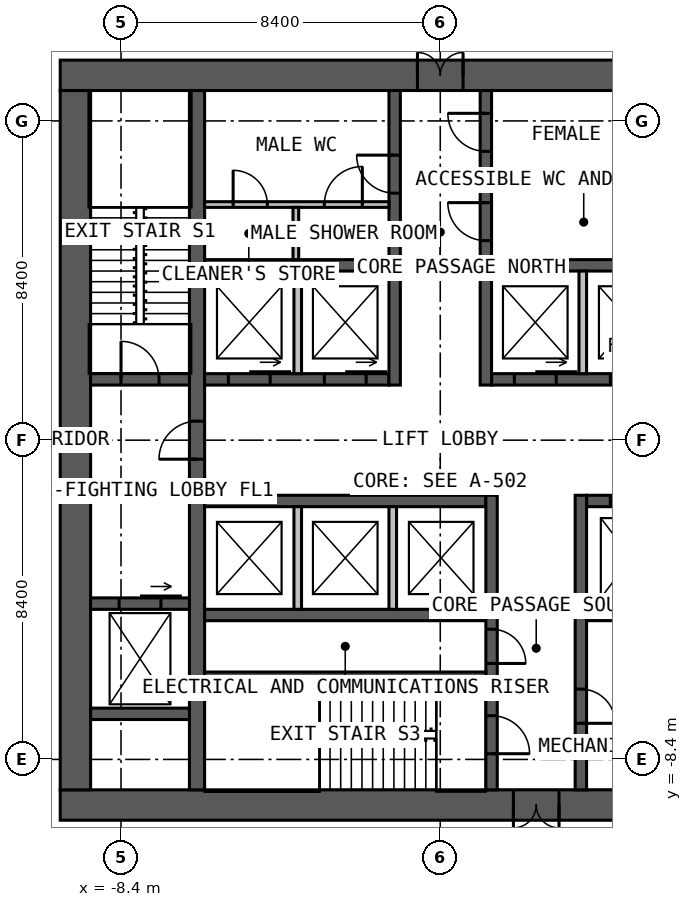
"""IFC4 building model, lengths in metres.
Left out: names, types, materials, properties, quantities, classifications, styles, units other than length and angle.
Written with IfcOpenShell. Run it as: python <this file> out.ifc"""

import sys

from ifc_helpers import new_model, si_unit, direction, frame, frame_2d, origin, place, context, subcontext, project, spatial, rectangle, extrude, element, fill, save


model = new_model("IFC4")
c1 = context("Model", 3, precision=1e-05, world=origin(), true_north=direction((0.0, 1.0)))
c2 = subcontext(c1, "Body", "Model", "MODEL_VIEW")
j1 = project(units=[si_unit("LENGTHUNIT", "METRE"), si_unit("PLANEANGLEUNIT", "RADIAN")], contexts=[c1])
p1 = place(None, origin())
s1 = spatial("IfcSite", under=j1, at=p1, CompositionType="ELEMENT")
p2 = place(p1, origin())
s2 = spatial("IfcBuilding", under=s1, at=p2, CompositionType="ELEMENT")
p3 = place(p2, frame((0.0, 0.0, 81.0)))
s3 = spatial("IfcBuildingStorey", under=s2, at=p3, CompositionType="ELEMENT", Elevation=81.0)
p4 = place(p3, frame((-10.0, 9.6, 0.0), z_axis=(0.0, 0.0, 1.0), x_axis=(1.0, 0.0, 0.0)))
e1 = element("IfcWall", 1, at=p4, inside=s3, PredefinedType="SOLIDWALL", context=c2, shape_type="SweptSolid", body=[
    extrude(rectangle(XDim=20.0, YDim=0.8, at=frame_2d((10.0, 0.0))), origin(), (0.0, 0.0, 1.0), 4.0),
])
p5 = place(p4, frame((9.4, 0.0, 0.0)))
e2 = element("IfcOpeningElement", 2, at=p5, cuts=e1, PredefinedType="OPENING", context=c2, shape_type="SweptSolid", body=[
    extrude(rectangle(XDim=1.2, YDim=2.2, at=frame_2d((0.6, 1.1))), frame((0.0, 0.41, 0.0), z_axis=(0.0, -1.0, 0.0), x_axis=(1.0, 0.0, 0.0)), (0.0, 0.0, 1.0), 0.82),
])
p6 = place(p3, frame((10.0, -9.6, 0.0), z_axis=(0.0, 0.0, 1.0), x_axis=(-1.0, 0.0, 0.0)))
e3 = element("IfcWall", 3, at=p6, inside=s3, PredefinedType="SOLIDWALL", context=c2, shape_type="SweptSolid", body=[
    extrude(rectangle(XDim=20.0, YDim=0.8, at=frame_2d((10.0, 0.0))), origin(), (0.0, 0.0, 1.0), 4.0),
])
p7 = place(p6, frame((6.875, 0.0, 0.0)))
e4 = element("IfcOpeningElement", 4, at=p7, cuts=e3, PredefinedType="OPENING", context=c2, shape_type="SweptSolid", body=[
    extrude(rectangle(XDim=1.2, YDim=2.2, at=frame_2d((0.6, 1.1))), frame((0.0, 0.41, 0.0), z_axis=(0.0, -1.0, 0.0), x_axis=(1.0, 0.0, 0.0)), (0.0, 0.0, 1.0), 0.82),
])
p8 = place(p3, frame((-9.6, 9.2, 0.0), z_axis=(0.0, 0.0, 1.0), x_axis=(0.0, -1.0, 0.0)))
e5 = element("IfcWall", 5, at=p8, inside=s3, PredefinedType="SOLIDWALL", context=c2, shape_type="SweptSolid", body=[
    extrude(rectangle(XDim=18.4, YDim=0.8, at=frame_2d((9.2, 0.0))), origin(), (0.0, 0.0, 1.0), 4.0),
])
p9 = place(p3, frame((-6.4, -9.2, 0.0), z_axis=(0.0, 0.0, 1.0), x_axis=(0.0, 1.0, 0.0)))
e6 = element("IfcWall", 6, at=p9, inside=s3, PredefinedType="SOLIDWALL", context=c2, shape_type="SweptSolid", body=[
    extrude(rectangle(XDim=18.4, YDim=0.4, at=frame_2d((9.2, 0.0))), origin(), (0.0, 0.0, 1.0), 4.0),
])
p10 = place(p9, frame((8.7, 0.0, 0.0)))
e7 = element("IfcOpeningElement", 7, at=p10, cuts=e6, PredefinedType="OPENING", context=c2, shape_type="SweptSolid", body=[
    extrude(rectangle(XDim=1.0, YDim=2.2, at=frame_2d((0.5, 1.1))), frame((0.0, 0.21, 0.0), z_axis=(0.0, -1.0, 0.0), x_axis=(1.0, 0.0, 0.0)), (0.0, 0.0, 1.0), 0.42),
])
p11 = place(p3, frame((-6.2, 1.6, 0.0), z_axis=(0.0, 0.0, 1.0), x_axis=(1.0, 0.0, 0.0)))
e8 = element("IfcWall", 8, at=p11, inside=s3, PredefinedType="SOLIDWALL", context=c2, shape_type="SweptSolid", body=[
    extrude(rectangle(XDim=4.85, YDim=0.3, at=frame_2d((2.425, 0.0))), origin(), (0.0, 0.0, 1.0), 4.0),
])
p12 = place(p11, frame((0.625, 0.0, 0.0)))
e9 = element("IfcOpeningElement", 9, at=p12, cuts=e8, PredefinedType="OPENING", context=c2, shape_type="SweptSolid", body=[
    extrude(rectangle(XDim=1.1, YDim=2.2, at=frame_2d((0.55, 1.1))), frame((0.0, 0.16, 0.0), z_axis=(0.0, -1.0, 0.0), x_axis=(1.0, 0.0, 0.0)), (0.0, 0.0, 1.0), 0.32),
])
p13 = place(p11, frame((3.15, 0.0, 0.0)))
e10 = element("IfcOpeningElement", 10, at=p13, cuts=e8, PredefinedType="OPENING", context=c2, shape_type="SweptSolid", body=[
    extrude(rectangle(XDim=1.1, YDim=2.2, at=frame_2d((0.55, 1.1))), frame((0.0, 0.16, 0.0), z_axis=(0.0, -1.0, 0.0), x_axis=(1.0, 0.0, 0.0)), (0.0, 0.0, 1.0), 0.32),
])
p14 = place(p3, frame((1.35, 1.6, 0.0), z_axis=(0.0, 0.0, 1.0), x_axis=(1.0, 0.0, 0.0)))
e11 = element("IfcWall", 11, at=p14, inside=s3, PredefinedType="SOLIDWALL", context=c2, shape_type="SweptSolid", body=[
    extrude(rectangle(XDim=4.85, YDim=0.3, at=frame_2d((2.425, 0.0))), origin(), (0.0, 0.0, 1.0), 4.0),
])
p15 = place(p14, frame((0.6, 0.0, 0.0)))
e12 = element("IfcOpeningElement", 12, at=p15, cuts=e11, PredefinedType="OPENING", context=c2, shape_type="SweptSolid", body=[
    extrude(rectangle(XDim=1.1, YDim=2.2, at=frame_2d((0.55, 1.1))), frame((0.0, 0.16, 0.0), z_axis=(0.0, -1.0, 0.0), x_axis=(1.0, 0.0, 0.0)), (0.0, 0.0, 1.0), 0.32),
])
p16 = place(p14, frame((3.125, 0.0, 0.0)))
e13 = element("IfcOpeningElement", 13, at=p16, cuts=e11, PredefinedType="OPENING", context=c2, shape_type="SweptSolid", body=[
    extrude(rectangle(XDim=1.1, YDim=2.2, at=frame_2d((0.55, 1.1))), frame((0.0, 0.16, 0.0), z_axis=(0.0, -1.0, 0.0), x_axis=(1.0, 0.0, 0.0)), (0.0, 0.0, 1.0), 0.32),
])
for number, where, z_axis, x_axis in (
    (14, (-6.2, 4.6, 0.0), (0.0, 0.0, 1.0), (1.0, 0.0, 0.0)),
    (15, (1.35, 4.6, 0.0), (0.0, 0.0, 1.0), (1.0, 0.0, 0.0)),
):
    element("IfcWall", number, at=place(p3, frame(where, z_axis=z_axis, x_axis=x_axis)), inside=s3, PredefinedType="SOLIDWALL", context=c2, shape_type="SweptSolid", body=[
        extrude(rectangle(XDim=4.85, YDim=0.3, at=frame_2d((2.425, 0.0))), origin(), (0.0, 0.0, 1.0), 4.0),
    ])
p17 = place(p3, frame((-1.2, 1.45, 0.0), z_axis=(0.0, 0.0, 1.0), x_axis=(0.0, 1.0, 0.0)))
e16 = element("IfcWall", 16, at=p17, inside=s3, PredefinedType="SOLIDWALL", context=c2, shape_type="SweptSolid", body=[
    extrude(rectangle(XDim=7.75, YDim=0.3, at=frame_2d((3.875, 0.0))), origin(), (0.0, 0.0, 1.0), 4.0),
])
p18 = place(p17, frame((5.05, 0.0, 0.0)))
e17 = element("IfcOpeningElement", 17, at=p18, cuts=e16, PredefinedType="OPENING", context=c2, shape_type="SweptSolid", body=[
    extrude(rectangle(XDim=1.0, YDim=2.2, at=frame_2d((0.5, 1.1))), frame((0.0, 0.16, 0.0), z_axis=(0.0, -1.0, 0.0), x_axis=(1.0, 0.0, 0.0)), (0.0, 0.0, 1.0), 0.32),
])
p19 = place(p3, frame((1.2, 1.45, 0.0), z_axis=(0.0, 0.0, 1.0), x_axis=(0.0, 1.0, 0.0)))
e18 = element("IfcWall", 18, at=p19, inside=s3, PredefinedType="SOLIDWALL", context=c2, shape_type="SweptSolid", body=[
    extrude(rectangle(XDim=7.75, YDim=0.3, at=frame_2d((3.875, 0.0))), origin(), (0.0, 0.0, 1.0), 4.0),
])
p20 = place(p19, frame((3.8, 0.0, 0.0)))
e19 = element("IfcOpeningElement", 19, at=p20, cuts=e18, PredefinedType="OPENING", context=c2, shape_type="SweptSolid", body=[
    extrude(rectangle(XDim=1.0, YDim=2.2, at=frame_2d((0.5, 1.1))), frame((0.0, 0.16, 0.0), z_axis=(0.0, -1.0, 0.0), x_axis=(1.0, 0.0, 0.0)), (0.0, 0.0, 1.0), 0.32),
])
p21 = place(p19, frame((6.15, 0.0, 0.0)))
e20 = element("IfcOpeningElement", 20, at=p21, cuts=e18, PredefinedType="OPENING", context=c2, shape_type="SweptSolid", body=[
    extrude(rectangle(XDim=1.0, YDim=2.2, at=frame_2d((0.5, 1.1))), frame((0.0, 0.16, 0.0), z_axis=(0.0, -1.0, 0.0), x_axis=(1.0, 0.0, 0.0)), (0.0, 0.0, 1.0), 0.32),
])
p22 = place(p3, frame((-6.2, -1.6, 0.0), z_axis=(0.0, 0.0, 1.0), x_axis=(1.0, 0.0, 0.0)))
e21 = element("IfcWall", 21, at=p22, inside=s3, PredefinedType="SOLIDWALL", context=c2, shape_type="SweptSolid", body=[
    extrude(rectangle(XDim=7.4, YDim=0.3, at=frame_2d((3.7, 0.0))), origin(), (0.0, 0.0, 1.0), 4.0),
])
p23 = place(p3, frame((3.85, -1.6, 0.0), z_axis=(0.0, 0.0, 1.0), x_axis=(1.0, 0.0, 0.0)))
e22 = element("IfcWall", 22, at=p23, inside=s3, PredefinedType="SOLIDWALL", context=c2, shape_type="SweptSolid", body=[
    extrude(rectangle(XDim=2.35, YDim=0.3, at=frame_2d((1.175, 0.0))), origin(), (0.0, 0.0, 1.0), 4.0),
])
p24 = place(p23, frame((0.625, 0.0, 0.0)))
e23 = element("IfcOpeningElement", 23, at=p24, cuts=e22, PredefinedType="OPENING", context=c2, shape_type="SweptSolid", body=[
    extrude(rectangle(XDim=1.1, YDim=2.2, at=frame_2d((0.55, 1.1))), frame((0.0, 0.16, 0.0), z_axis=(0.0, -1.0, 0.0), x_axis=(1.0, 0.0, 0.0)), (0.0, 0.0, 1.0), 0.32),
])
p25 = place(p3, frame((-6.2, -4.6, 0.0), z_axis=(0.0, 0.0, 1.0), x_axis=(1.0, 0.0, 0.0)))
e24 = element("IfcWall", 24, at=p25, inside=s3, PredefinedType="SOLIDWALL", context=c2, shape_type="SweptSolid", body=[
    extrude(rectangle(XDim=7.4, YDim=0.3, at=frame_2d((3.7, 0.0))), origin(), (0.0, 0.0, 1.0), 4.0),
])
p26 = place(p3, frame((3.85, -4.6, 0.0), z_axis=(0.0, 0.0, 1.0), x_axis=(1.0, 0.0, 0.0)))
e25 = element("IfcWall", 25, at=p26, inside=s3, PredefinedType="SOLIDWALL", context=c2, shape_type="SweptSolid", body=[
    extrude(rectangle(XDim=2.35, YDim=0.3, at=frame_2d((1.175, 0.0))), origin(), (0.0, 0.0, 1.0), 4.0),
])
p27 = place(p3, frame((1.35, -1.45, 0.0), z_axis=(0.0, 0.0, 1.0), x_axis=(0.0, -1.0, 0.0)))
e26 = element("IfcWall", 26, at=p27, inside=s3, PredefinedType="SOLIDWALL", context=c2, shape_type="SweptSolid", body=[
    extrude(rectangle(XDim=7.75, YDim=0.3, at=frame_2d((3.875, 0.0))), origin(), (0.0, 0.0, 1.0), 4.0),
])
p28 = place(p27, frame((5.8, 0.0, 0.0)))
e27 = element("IfcOpeningElement", 27, at=p28, cuts=e26, PredefinedType="OPENING", context=c2, shape_type="SweptSolid", body=[
    extrude(rectangle(XDim=1.0, YDim=2.2, at=frame_2d((0.5, 1.1))), frame((0.0, 0.16, 0.0), z_axis=(0.0, -1.0, 0.0), x_axis=(1.0, 0.0, 0.0)), (0.0, 0.0, 1.0), 0.32),
])
p29 = place(p27, frame((3.525, 0.0, 0.0)))
e28 = element("IfcOpeningElement", 28, at=p29, cuts=e26, PredefinedType="OPENING", context=c2, shape_type="SweptSolid", body=[
    extrude(rectangle(XDim=0.9, YDim=2.2, at=frame_2d((0.45, 1.1))), frame((0.0, 0.16, 0.0), z_axis=(0.0, -1.0, 0.0), x_axis=(1.0, 0.0, 0.0)), (0.0, 0.0, 1.0), 0.32),
])
p30 = place(p3, frame((3.7, -1.45, 0.0), z_axis=(0.0, 0.0, 1.0), x_axis=(0.0, -1.0, 0.0)))
e29 = element("IfcWall", 29, at=p30, inside=s3, PredefinedType="SOLIDWALL", context=c2, shape_type="SweptSolid", body=[
    extrude(rectangle(XDim=7.75, YDim=0.3, at=frame_2d((3.875, 0.0))), origin(), (0.0, 0.0, 1.0), 4.0),
])
p31 = place(p30, frame((5.1, 0.0, 0.0)))
e30 = element("IfcOpeningElement", 30, at=p31, cuts=e29, PredefinedType="OPENING", context=c2, shape_type="SweptSolid", body=[
    extrude(rectangle(XDim=0.9, YDim=2.2, at=frame_2d((0.45, 1.1))), frame((0.0, 0.16, 0.0), z_axis=(0.0, -1.0, 0.0), x_axis=(1.0, 0.0, 0.0)), (0.0, 0.0, 1.0), 0.32),
])
p32 = place(p3, frame((-6.2, -6.2, 0.0), z_axis=(0.0, 0.0, 1.0), x_axis=(1.0, 0.0, 0.0)))
e31 = element("IfcWall", 31, at=p32, inside=s3, PredefinedType="SOLIDWALL", context=c2, shape_type="SweptSolid", body=[
    extrude(rectangle(XDim=7.4, YDim=0.2, at=frame_2d((3.7, 0.0))), origin(), (0.0, 0.0, 1.0), 4.0),
])
p33 = place(p3, frame((-9.2, 1.6, 0.0), z_axis=(0.0, 0.0, 1.0), x_axis=(1.0, 0.0, 0.0)))
e32 = element("IfcWall", 32, at=p33, inside=s3, PredefinedType="SOLIDWALL", context=c2, shape_type="SweptSolid", body=[
    extrude(rectangle(XDim=2.6, YDim=0.3, at=frame_2d((1.3, 0.0))), origin(), (0.0, 0.0, 1.0), 4.0),
])
p34 = place(p33, frame((0.8, 0.0, 0.0)))
e33 = element("IfcOpeningElement", 33, at=p34, cuts=e32, PredefinedType="OPENING", context=c2, shape_type="SweptSolid", body=[
    extrude(rectangle(XDim=1.0, YDim=2.2, at=frame_2d((0.5, 1.1))), frame((0.0, 0.16, 0.0), z_axis=(0.0, -1.0, 0.0), x_axis=(1.0, 0.0, 0.0)), (0.0, 0.0, 1.0), 0.32),
])
p35 = place(p3, frame((-9.2, -4.3, 0.0), z_axis=(0.0, 0.0, 1.0), x_axis=(1.0, 0.0, 0.0)))
e34 = element("IfcWall", 34, at=p35, inside=s3, PredefinedType="SOLIDWALL", context=c2, shape_type="SweptSolid", body=[
    extrude(rectangle(XDim=2.6, YDim=0.3, at=frame_2d((1.3, 0.0))), origin(), (0.0, 0.0, 1.0), 4.0),
])
p36 = place(p35, frame((0.75, 0.0, 0.0)))
e35 = element("IfcOpeningElement", 35, at=p36, cuts=e34, PredefinedType="OPENING", context=c2, shape_type="SweptSolid", body=[
    extrude(rectangle(XDim=1.1, YDim=2.2, at=frame_2d((0.55, 1.1))), frame((0.0, 0.16, 0.0), z_axis=(0.0, -1.0, 0.0), x_axis=(1.0, 0.0, 0.0)), (0.0, 0.0, 1.0), 0.32),
])
p37 = place(p3, frame((-9.2, -7.2, 0.0), z_axis=(0.0, 0.0, 1.0), x_axis=(1.0, 0.0, 0.0)))
e36 = element("IfcWall", 36, at=p37, inside=s3, PredefinedType="SOLIDWALL", context=c2, shape_type="SweptSolid", body=[
    extrude(rectangle(XDim=2.6, YDim=0.3, at=frame_2d((1.3, 0.0))), origin(), (0.0, 0.0, 1.0), 4.0),
])
for number, where, z_axis, x_axis in (
    (37, (-3.75, 1.75, 0.0), (0.0, 0.0, 1.0), (0.0, 1.0, 0.0)),
    (38, (3.75, 1.75, 0.0), (0.0, 0.0, 1.0), (0.0, 1.0, 0.0)),
    (39, (-3.75, -1.75, 0.0), (0.0, 0.0, 1.0), (0.0, -1.0, 0.0)),
    (40, (-1.25, -1.75, 0.0), (0.0, 0.0, 1.0), (0.0, -1.0, 0.0)),
):
    element("IfcWall", number, at=place(p3, frame(where, z_axis=z_axis, x_axis=x_axis)), inside=s3, PredefinedType="SOLIDWALL", context=c2, shape_type="SweptSolid", body=[
        extrude(rectangle(XDim=2.7, YDim=0.2, at=frame_2d((1.35, 0.0))), origin(), (0.0, 0.0, 1.0), 3.75),
    ])
p38 = place(p3, frame((1.35, 6.8, 0.0), z_axis=(0.0, 0.0, 1.0), x_axis=(1.0, 0.0, 0.0)))
e41 = element("IfcWall", 41, at=p38, inside=s3, PredefinedType="PARTITIONING", context=c2, shape_type="SweptSolid", body=[
    extrude(rectangle(XDim=4.85, YDim=0.15, at=frame_2d((2.425, 0.0))), origin(), (0.0, 0.0, 1.0), 3.75),
])
p39 = place(p3, frame((-6.2, 6.2, 0.0), z_axis=(0.0, 0.0, 1.0), x_axis=(1.0, 0.0, 0.0)))
e42 = element("IfcWall", 42, at=p39, inside=s3, PredefinedType="PARTITIONING", context=c2, shape_type="SweptSolid", body=[
    extrude(rectangle(XDim=4.85, YDim=0.15, at=frame_2d((2.425, 0.0))), origin(), (0.0, 0.0, 1.0), 3.75),
])
p40 = place(p39, frame((3.15, 0.0, 0.0)))
e43 = element("IfcOpeningElement", 43, at=p40, cuts=e42, PredefinedType="OPENING", context=c2, shape_type="SweptSolid", body=[
    extrude(rectangle(XDim=1.0, YDim=2.2, at=frame_2d((0.5, 1.1))), frame((0.0, 0.085, 0.0), z_axis=(0.0, -1.0, 0.0), x_axis=(1.0, 0.0, 0.0)), (0.0, 0.0, 1.0), 0.17),
])
p41 = place(p39, frame((0.75, 0.0, 0.0)))
e44 = element("IfcOpeningElement", 44, at=p41, cuts=e42, PredefinedType="OPENING", context=c2, shape_type="SweptSolid", body=[
    extrude(rectangle(XDim=0.9, YDim=2.2, at=frame_2d((0.45, 1.1))), frame((0.0, 0.085, 0.0), z_axis=(0.0, -1.0, 0.0), x_axis=(1.0, 0.0, 0.0)), (0.0, 0.0, 1.0), 0.17),
])
p42 = place(p3, frame((-3.8, 4.75, 0.0), z_axis=(0.0, 0.0, 1.0), x_axis=(0.0, 1.0, 0.0)))
e45 = element("IfcWall", 45, at=p42, inside=s3, PredefinedType="PARTITIONING", context=c2, shape_type="SweptSolid", body=[
    extrude(rectangle(XDim=1.375, YDim=0.15, at=frame_2d((0.688, 0.0))), origin(), (0.0, 0.0, 1.0), 3.75),
])
p43 = place(p5, origin())
e46 = element("IfcDoor", 46, at=p43, inside=s3, OperationType="DOUBLE_DOOR_SINGLE_SWING", PredefinedType="DOOR", context=c2, shape_type="SweptSolid", body=[
    extrude(rectangle(XDim=1.2, YDim=2.2, at=frame_2d((0.6, 1.1))), frame((0.0, 0.025, 0.0), z_axis=(0.0, -1.0, 0.0), x_axis=(1.0, 0.0, 0.0)), (0.0, 0.0, 1.0), 0.05),
])
fill(e2, e46)
p44 = place(p7, origin())
e47 = element("IfcDoor", 47, at=p44, inside=s3, OperationType="DOUBLE_DOOR_SINGLE_SWING", PredefinedType="DOOR", context=c2, shape_type="SweptSolid", body=[
    extrude(rectangle(XDim=1.2, YDim=2.2, at=frame_2d((0.6, 1.1))), frame((0.0, 0.025, 0.0), z_axis=(0.0, -1.0, 0.0), x_axis=(1.0, 0.0, 0.0)), (0.0, 0.0, 1.0), 0.05),
])
fill(e4, e47)
p45 = place(p10, origin())
e48 = element("IfcDoor", 48, at=p45, inside=s3, OperationType="SINGLE_SWING_LEFT", PredefinedType="DOOR", context=c2, shape_type="SweptSolid", body=[
    extrude(rectangle(XDim=1.0, YDim=2.2, at=frame_2d((0.5, 1.1))), frame((0.0, 0.025, 0.0), z_axis=(0.0, -1.0, 0.0), x_axis=(1.0, 0.0, 0.0)), (0.0, 0.0, 1.0), 0.05),
])
fill(e7, e48)
p46 = place(p34, origin())
e49 = element("IfcDoor", 49, at=p46, inside=s3, OperationType="SINGLE_SWING_LEFT", PredefinedType="DOOR", context=c2, shape_type="SweptSolid", body=[
    extrude(rectangle(XDim=1.0, YDim=2.2, at=frame_2d((0.5, 1.1))), frame((0.0, 0.025, 0.0), z_axis=(0.0, -1.0, 0.0), x_axis=(1.0, 0.0, 0.0)), (0.0, 0.0, 1.0), 0.05),
])
fill(e33, e49)
p47 = place(p28, origin())
e50 = element("IfcDoor", 50, at=p47, inside=s3, OperationType="SINGLE_SWING_RIGHT", PredefinedType="DOOR", context=c2, shape_type="SweptSolid", body=[
    extrude(rectangle(XDim=1.0, YDim=2.2, at=frame_2d((0.5, 1.1))), frame((0.0, 0.025, 0.0), z_axis=(0.0, -1.0, 0.0), x_axis=(1.0, 0.0, 0.0)), (0.0, 0.0, 1.0), 0.05),
])
fill(e27, e50)
p48 = place(p18, origin())
e51 = element("IfcDoor", 51, at=p48, inside=s3, OperationType="SINGLE_SWING_RIGHT", PredefinedType="DOOR", context=c2, shape_type="SweptSolid", body=[
    extrude(rectangle(XDim=1.0, YDim=2.2, at=frame_2d((0.5, 1.1))), frame((0.0, 0.025, 0.0), z_axis=(0.0, -1.0, 0.0), x_axis=(1.0, 0.0, 0.0)), (0.0, 0.0, 1.0), 0.05),
])
fill(e17, e51)
p49 = place(p20, origin())
e52 = element("IfcDoor", 52, at=p49, inside=s3, OperationType="SINGLE_SWING_RIGHT", PredefinedType="DOOR", context=c2, shape_type="SweptSolid", body=[
    extrude(rectangle(XDim=1.0, YDim=2.2, at=frame_2d((0.5, 1.1))), frame((0.0, 0.025, 0.0), z_axis=(0.0, -1.0, 0.0), x_axis=(1.0, 0.0, 0.0)), (0.0, 0.0, 1.0), 0.05),
])
fill(e19, e52)
p50 = place(p21, origin())
e53 = element("IfcDoor", 53, at=p50, inside=s3, OperationType="SINGLE_SWING_RIGHT", PredefinedType="DOOR", context=c2, shape_type="SweptSolid", body=[
    extrude(rectangle(XDim=1.0, YDim=2.2, at=frame_2d((0.5, 1.1))), frame((0.0, 0.025, 0.0), z_axis=(0.0, -1.0, 0.0), x_axis=(1.0, 0.0, 0.0)), (0.0, 0.0, 1.0), 0.05),
])
fill(e20, e53)
p51 = place(p29, origin())
e54 = element("IfcDoor", 54, at=p51, inside=s3, OperationType="SINGLE_SWING_RIGHT", PredefinedType="DOOR", context=c2, shape_type="SweptSolid", body=[
    extrude(rectangle(XDim=0.9, YDim=2.2, at=frame_2d((0.45, 1.1))), frame((0.0, 0.025, 0.0), z_axis=(0.0, -1.0, 0.0), x_axis=(1.0, 0.0, 0.0)), (0.0, 0.0, 1.0), 0.05),
])
fill(e28, e54)
p52 = place(p31, origin())
e55 = element("IfcDoor", 55, at=p52, inside=s3, OperationType="SINGLE_SWING_RIGHT", PredefinedType="DOOR", context=c2, shape_type="SweptSolid", body=[
    extrude(rectangle(XDim=0.9, YDim=2.2, at=frame_2d((0.45, 1.1))), frame((0.0, 0.025, 0.0), z_axis=(0.0, -1.0, 0.0), x_axis=(1.0, 0.0, 0.0)), (0.0, 0.0, 1.0), 0.05),
])
fill(e30, e55)
p53 = place(p40, origin())
e56 = element("IfcDoor", 56, at=p53, inside=s3, OperationType="SINGLE_SWING_RIGHT", PredefinedType="DOOR", context=c2, shape_type="SweptSolid", body=[
    extrude(rectangle(XDim=1.0, YDim=2.2, at=frame_2d((0.5, 1.1))), frame((0.0, 0.025, 0.0), z_axis=(0.0, -1.0, 0.0), x_axis=(1.0, 0.0, 0.0)), (0.0, 0.0, 1.0), 0.05),
])
fill(e43, e56)
p54 = place(p41, origin())
e57 = element("IfcDoor", 57, at=p54, inside=s3, OperationType="SINGLE_SWING_LEFT", PredefinedType="DOOR", context=c2, shape_type="SweptSolid", body=[
    extrude(rectangle(XDim=0.9, YDim=2.2, at=frame_2d((0.45, 1.1))), frame((0.0, 0.025, 0.0), z_axis=(0.0, -1.0, 0.0), x_axis=(1.0, 0.0, 0.0)), (0.0, 0.0, 1.0), 0.05),
])
fill(e44, e57)
p55 = place(p12, origin())
e58 = element("IfcDoor", 58, at=p55, inside=s3, OperationType="SLIDING_TO_LEFT", PredefinedType="DOOR", context=c2, shape_type="SweptSolid", body=[
    extrude(rectangle(XDim=1.1, YDim=2.2, at=frame_2d((0.55, 1.1))), frame((0.0, 0.025, 0.0), z_axis=(0.0, -1.0, 0.0), x_axis=(1.0, 0.0, 0.0)), (0.0, 0.0, 1.0), 0.05),
])
fill(e9, e58)
p56 = place(p13, origin())
e59 = element("IfcDoor", 59, at=p56, inside=s3, OperationType="SLIDING_TO_LEFT", PredefinedType="DOOR", context=c2, shape_type="SweptSolid", body=[
    extrude(rectangle(XDim=1.1, YDim=2.2, at=frame_2d((0.55, 1.1))), frame((0.0, 0.025, 0.0), z_axis=(0.0, -1.0, 0.0), x_axis=(1.0, 0.0, 0.0)), (0.0, 0.0, 1.0), 0.05),
])
fill(e10, e59)
p57 = place(p15, origin())
e60 = element("IfcDoor", 60, at=p57, inside=s3, OperationType="SLIDING_TO_LEFT", PredefinedType="DOOR", context=c2, shape_type="SweptSolid", body=[
    extrude(rectangle(XDim=1.1, YDim=2.2, at=frame_2d((0.55, 1.1))), frame((0.0, 0.025, 0.0), z_axis=(0.0, -1.0, 0.0), x_axis=(1.0, 0.0, 0.0)), (0.0, 0.0, 1.0), 0.05),
])
fill(e12, e60)
p58 = place(p16, origin())
e61 = element("IfcDoor", 61, at=p58, inside=s3, OperationType="SLIDING_TO_LEFT", PredefinedType="DOOR", context=c2, shape_type="SweptSolid", body=[
    extrude(rectangle(XDim=1.1, YDim=2.2, at=frame_2d((0.55, 1.1))), frame((0.0, 0.025, 0.0), z_axis=(0.0, -1.0, 0.0), x_axis=(1.0, 0.0, 0.0)), (0.0, 0.0, 1.0), 0.05),
])
fill(e13, e61)
p59 = place(p24, origin())
e62 = element("IfcDoor", 62, at=p59, inside=s3, OperationType="SLIDING_TO_LEFT", PredefinedType="DOOR", context=c2, shape_type="SweptSolid", body=[
    extrude(rectangle(XDim=1.1, YDim=2.2, at=frame_2d((0.55, 1.1))), frame((0.0, 0.025, 0.0), z_axis=(0.0, -1.0, 0.0), x_axis=(1.0, 0.0, 0.0)), (0.0, 0.0, 1.0), 0.05),
])
fill(e23, e62)
p60 = place(p36, origin())
e63 = element("IfcDoor", 63, at=p60, inside=s3, OperationType="SLIDING_TO_LEFT", PredefinedType="DOOR", context=c2, shape_type="SweptSolid", body=[
    extrude(rectangle(XDim=1.1, YDim=2.2, at=frame_2d((0.55, 1.1))), frame((0.0, 0.025, 0.0), z_axis=(0.0, -1.0, 0.0), x_axis=(1.0, 0.0, 0.0)), (0.0, 0.0, 1.0), 0.05),
])
fill(e35, e63)
save(model, sys.argv[1])
